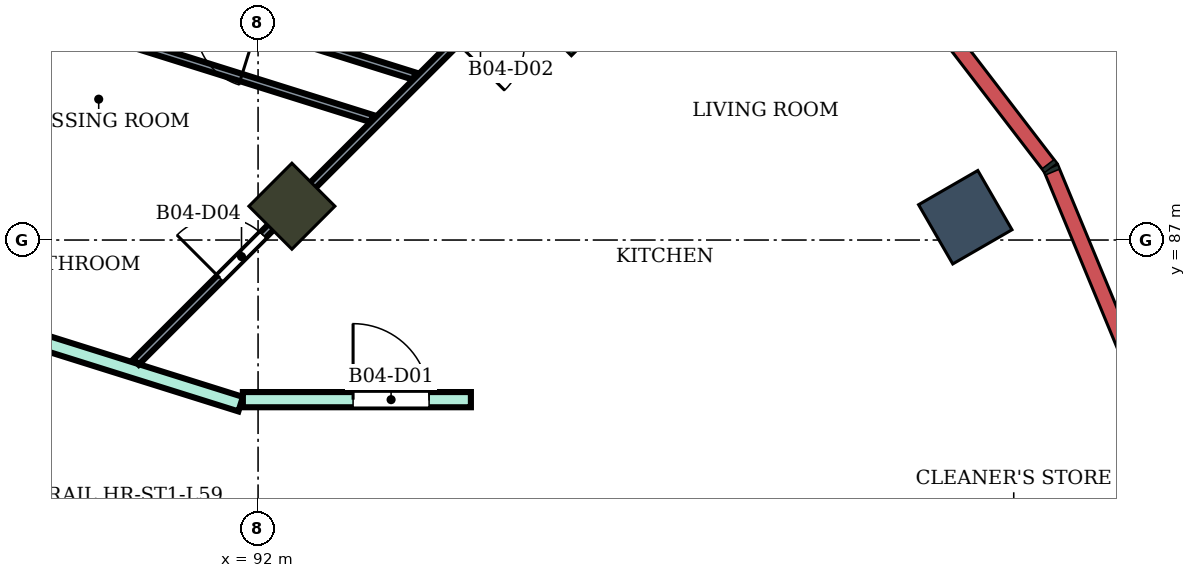
"""IFC4 building model, lengths in metres.
Left out: names, types, materials, properties, quantities, classifications, styles, units other than length and angle.
Written with IfcOpenShell. Run it as: python <this file> out.ifc"""

import sys

from ifc_helpers import new_model, si_unit, direction, frame, frame_2d, origin, origin_2d, place, context, subcontext, project, spatial, rectangle, extrude, element, fill, save


model = new_model("IFC4")
c1 = context("Model", 3, precision=1e-05, world=origin(), true_north=direction((0.0, 1.0)))
c2 = subcontext(c1, "Body", "Model", "MODEL_VIEW")
j1 = project(units=[si_unit("LENGTHUNIT", "METRE"), si_unit("PLANEANGLEUNIT", "RADIAN")], contexts=[c1])
p1 = place(None, origin())
s1 = spatial("IfcSite", under=j1, at=p1, CompositionType="ELEMENT")
p2 = place(p1, origin())
s2 = spatial("IfcBuilding", under=s1, at=p2, CompositionType="ELEMENT")
p3 = place(p2, frame((0.0, 0.0, 258.3)))
s3 = spatial("IfcBuildingStorey", under=s2, at=p3, CompositionType="ELEMENT", Elevation=258.3)
p4 = place(p3, frame((101.304, 87.3, 0.0), z_axis=(0.0, 0.0, 1.0), x_axis=(0.866025403784, 0.5, 0.0)))
e1 = element("IfcColumn", 1, at=p4, inside=s3, PredefinedType="COLUMN", context=c2, shape_type="SweptSolid", body=[
    extrude(rectangle(XDim=0.9, YDim=0.9, at=origin_2d()), origin(), (0.0, 0.0, 1.0), 4.2),
])
p5 = place(p3, frame((92.445, 87.445, 0.0), z_axis=(0.0, 0.0, 1.0), x_axis=(0.707106781187, 0.707106781187, 0.0)))
e2 = element("IfcColumn", 2, at=p5, inside=s3, PredefinedType="COLUMN", context=c2, shape_type="SweptSolid", body=[
    extrude(rectangle(XDim=0.8, YDim=0.8, at=origin_2d()), origin(), (0.0, 0.0, 1.0), 4.2),
])
p6 = place(p3, frame((95.91, 90.91, 0.0), z_axis=(0.0, 0.0, 1.0), x_axis=(0.707106781187, 0.707106781187, 0.0)))
e3 = element("IfcColumn", 3, at=p6, inside=s3, PredefinedType="COLUMN", context=c2, shape_type="SweptSolid", body=[
    extrude(rectangle(XDim=1.8, YDim=2.4, at=origin_2d()), origin(), (0.0, 0.0, 1.0), 4.2),
])
p7 = place(p3, frame((86.313, 86.554, 0.0), z_axis=(0.0, 0.0, 1.0), x_axis=(0.954077387881, -0.29956024091, 0.0)))
e4 = element("IfcWall", 4, at=p7, inside=s3, PredefinedType="PARTITIONING", context=c2, shape_type="SweptSolid", body=[
    extrude(rectangle(XDim=5.72, YDim=0.2, at=frame_2d((2.86, 0.0))), origin(), (0.0, 0.0, 1.0), 3.75),
])
p8 = place(p3, frame((86.677, 86.562, 0.0), z_axis=(0.0, 0.0, 1.0), x_axis=(0.500139020429, 0.865945125424, 0.0)))
e5 = element("IfcWall", 5, at=p8, inside=s3, PredefinedType="PARTITIONING", context=c2, shape_type="SweptSolid", body=[
    extrude(rectangle(XDim=12.446, YDim=0.2, at=frame_2d((6.223, 0.0))), origin(), (0.0, 0.0, 1.0), 3.75),
])
p9 = place(p3, frame((91.8, 84.9, 0.0), z_axis=(0.0, 0.0, 1.0), x_axis=(1.0, 0.0, 0.0)))
e6 = element("IfcWall", 6, at=p9, inside=s3, PredefinedType="PARTITIONING", context=c2, shape_type="SweptSolid", body=[
    extrude(rectangle(XDim=3.0, YDim=0.2, at=frame_2d((1.5, 0.0))), origin(), (0.0, 0.0, 1.0), 3.75),
])
p10 = place(p9, frame((1.45, 0.0, 0.0)))
e7 = element("IfcOpeningElement", 7, at=p10, cuts=e6, PredefinedType="OPENING", context=c2, shape_type="SweptSolid", body=[
    extrude(rectangle(XDim=1.0, YDim=2.1, at=frame_2d((0.5, 1.05))), frame((0.0, 0.11, 0.0), z_axis=(0.0, -1.0, 0.0), x_axis=(1.0, 0.0, 0.0)), (0.0, 0.0, 1.0), 0.22),
])
p11 = place(p3, frame((88.858, 90.053, 0.0), z_axis=(0.0, 0.0, 1.0), x_axis=(0.954180222183, -0.299232524294, 0.0)))
e8 = element("IfcWall", 8, at=p11, inside=s3, PredefinedType="PARTITIONING", context=c2, shape_type="SweptSolid", body=[
    extrude(rectangle(XDim=4.863, YDim=0.1, at=frame_2d((2.431, 0.0))), origin(), (0.0, 0.0, 1.0), 3.75),
])
p12 = place(p3, frame((89.18, 90.685, 0.0), z_axis=(0.0, 0.0, 1.0), x_axis=(0.954251036713, -0.299006620215, 0.0)))
e9 = element("IfcWall", 9, at=p12, inside=s3, PredefinedType="PARTITIONING", context=c2, shape_type="SweptSolid", body=[
    extrude(rectangle(XDim=5.111, YDim=0.1, at=frame_2d((2.555, 0.0))), origin(), (0.0, 0.0, 1.0), 3.75),
])
p13 = place(p12, frame((2.14, 0.0, 0.0)))
e10 = element("IfcOpeningElement", 10, at=p13, cuts=e9, PredefinedType="OPENING", context=c2, shape_type="SweptSolid", body=[
    extrude(rectangle(XDim=0.8, YDim=2.1, at=frame_2d((0.4, 1.05))), frame((0.0, 0.06, 0.0), z_axis=(0.0, -1.0, 0.0), x_axis=(1.0, 0.0, 0.0)), (0.0, 0.0, 1.0), 0.12),
])
p14 = place(p3, frame((90.395, 85.395, 0.0), z_axis=(0.0, 0.0, 1.0), x_axis=(0.707279106146, 0.706934414221, 0.0)))
e11 = element("IfcWall", 11, at=p14, inside=s3, PredefinedType="PARTITIONING", context=c2, shape_type="SweptSolid", body=[
    extrude(rectangle(XDim=8.5, YDim=0.1, at=frame_2d((4.25, 0.0))), origin(), (0.0, 0.0, 1.0), 3.75),
])
p15 = place(p14, frame((5.957, 0.0, 0.0)))
e12 = element("IfcOpeningElement", 12, at=p15, cuts=e11, PredefinedType="OPENING", context=c2, shape_type="SweptSolid", body=[
    extrude(rectangle(XDim=0.9, YDim=2.1, at=frame_2d((0.45, 1.05))), frame((0.0, 0.06, 0.0), z_axis=(0.0, -1.0, 0.0), x_axis=(1.0, 0.0, 0.0)), (0.0, 0.0, 1.0), 0.12),
])
p16 = place(p14, frame((1.562, 0.0, 0.0)))
e13 = element("IfcOpeningElement", 13, at=p16, cuts=e11, PredefinedType="OPENING", context=c2, shape_type="SweptSolid", body=[
    extrude(rectangle(XDim=0.8, YDim=2.1, at=frame_2d((0.4, 1.05))), frame((0.0, 0.06, 0.0), z_axis=(0.0, -1.0, 0.0), x_axis=(1.0, 0.0, 0.0)), (0.0, 0.0, 1.0), 0.12),
])
p17 = place(p10, origin())
e14 = element("IfcDoor", 14, at=p17, inside=s3, OperationType="SINGLE_SWING_LEFT", PredefinedType="DOOR", context=c2, shape_type="SweptSolid", body=[
    extrude(rectangle(XDim=1.0, YDim=2.1, at=frame_2d((0.5, 1.05))), frame((0.0, 0.025, 0.0), z_axis=(0.0, -1.0, 0.0), x_axis=(1.0, 0.0, 0.0)), (0.0, 0.0, 1.0), 0.05),
])
fill(e7, e14)
p18 = place(p16, origin())
e15 = element("IfcDoor", 15, at=p18, inside=s3, OperationType="SINGLE_SWING_LEFT", PredefinedType="DOOR", context=c2, shape_type="SweptSolid", body=[
    extrude(rectangle(XDim=0.8, YDim=2.1, at=frame_2d((0.4, 1.05))), frame((0.0, 0.025, 0.0), z_axis=(0.0, -1.0, 0.0), x_axis=(1.0, 0.0, 0.0)), (0.0, 0.0, 1.0), 0.05),
])
fill(e13, e15)
save(model, sys.argv[1])
